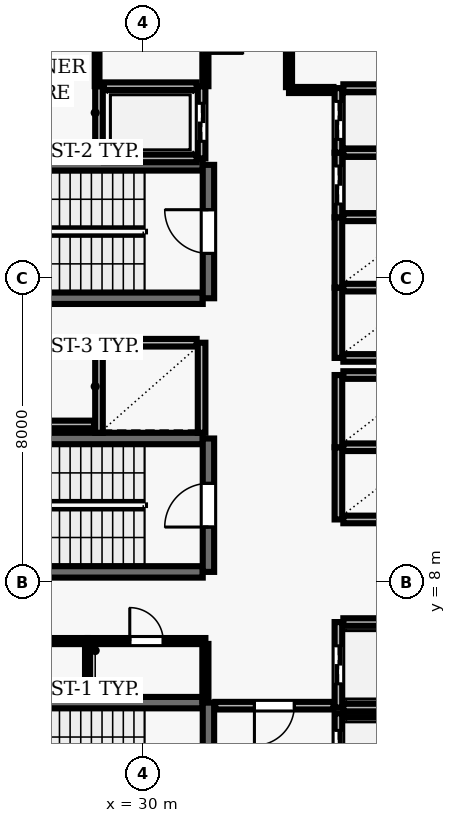
"""IFC4 building model, lengths in metres.
Left out: names, types, materials, properties, quantities, classifications, styles, units other than length and angle.
Written with IfcOpenShell. Run it as: python <this file> out.ifc"""

import sys

from ifc_helpers import new_model, si_unit, direction, frame, frame_2d, origin, place, context, subcontext, project, spatial, rectangle, extrude, element, fill, save


model = new_model("IFC4")
c1 = context("Model", 3, precision=1e-05, world=origin(), true_north=direction((0.0, 1.0)))
c2 = subcontext(c1, "Body", "Model", "MODEL_VIEW")
j1 = project(units=[si_unit("LENGTHUNIT", "METRE"), si_unit("PLANEANGLEUNIT", "RADIAN")], contexts=[c1])
p1 = place(None, origin())
s1 = spatial("IfcSite", under=j1, at=p1, CompositionType="ELEMENT")
p2 = place(p1, origin())
s2 = spatial("IfcBuilding", under=s1, at=p2, CompositionType="ELEMENT")
p3 = place(p2, frame((0.0, 0.0, 150.2)))
s3 = spatial("IfcBuildingStorey", under=s2, at=p3, CompositionType="ELEMENT", Elevation=150.2)
p4 = place(p3, frame((31.58, 4.83, 0.0), z_axis=(0.0, 0.0, 1.0), x_axis=(-1.0, 0.0, 0.0)))
e1 = element("IfcWall", 1, at=p4, inside=s3, PredefinedType="SHEAR", context=c2, shape_type="SweptSolid", body=[
    extrude(rectangle(XDim=8.36, YDim=0.3, at=frame_2d((4.18, 0.0))), origin(), (0.0, 0.0, 1.0), 3.69),
])
p5 = place(p3, frame((31.73, 0.96, 0.0), z_axis=(0.0, 0.0, 1.0), x_axis=(0.0, 1.0, 0.0)))
e2 = element("IfcWall", 2, at=p5, inside=s3, PredefinedType="SHEAR", context=c2, shape_type="SweptSolid", body=[
    extrude(rectangle(XDim=3.87, YDim=0.3, at=frame_2d((1.935, 0.0))), origin(), (0.0, 0.0, 1.0), 3.69),
])
p6 = place(p5, frame((1.54, 0.0, 0.0)))
e3 = element("IfcOpeningElement", 3, at=p6, cuts=e2, PredefinedType="OPENING", context=c2, shape_type="SweptSolid", body=[
    extrude(rectangle(XDim=1.15, YDim=2.15, at=frame_2d((0.575, 1.075))), frame((0.0, 0.16, 0.0), z_axis=(0.0, -1.0, 0.0), x_axis=(1.0, 0.0, 0.0)), (0.0, 0.0, 1.0), 0.32),
])
for number, where, z_axis, x_axis in (
    (4, (31.58, 18.98, 0.0), (0.0, 0.0, 1.0), (-1.0, 0.0, 0.0)),
    (5, (23.22, 15.47, 0.0), (0.0, 0.0, 1.0), (1.0, 0.0, 0.0)),
):
    element("IfcWall", number, at=place(p3, frame(where, z_axis=z_axis, x_axis=x_axis)), inside=s3, PredefinedType="SHEAR", context=c2, shape_type="SweptSolid", body=[
        extrude(rectangle(XDim=8.36, YDim=0.3, at=frame_2d((4.18, 0.0))), origin(), (0.0, 0.0, 1.0), 3.69),
    ])
p7 = place(p3, frame((31.73, 15.47, 0.0), z_axis=(0.0, 0.0, 1.0), x_axis=(0.0, 1.0, 0.0)))
e6 = element("IfcWall", 6, at=p7, inside=s3, PredefinedType="SHEAR", context=c2, shape_type="SweptSolid", body=[
    extrude(rectangle(XDim=3.51, YDim=0.3, at=frame_2d((1.755, 0.0))), origin(), (0.0, 0.0, 1.0), 3.69),
])
p8 = place(p7, frame((1.18, 0.0, 0.0)))
e7 = element("IfcOpeningElement", 7, at=p8, cuts=e6, PredefinedType="OPENING", context=c2, shape_type="SweptSolid", body=[
    extrude(rectangle(XDim=1.15, YDim=2.15, at=frame_2d((0.575, 1.075))), frame((0.0, 0.16, 0.0), z_axis=(0.0, -1.0, 0.0), x_axis=(1.0, 0.0, 0.0)), (0.0, 0.0, 1.0), 0.32),
])
for number, where, z_axis, x_axis in (
    (8, (31.58, 11.78, 0.0), (0.0, 0.0, 1.0), (-1.0, 0.0, 0.0)),
    (9, (23.22, 8.27, 0.0), (0.0, 0.0, 1.0), (1.0, 0.0, 0.0)),
):
    element("IfcWall", number, at=place(p3, frame(where, z_axis=z_axis, x_axis=x_axis)), inside=s3, PredefinedType="SHEAR", context=c2, shape_type="SweptSolid", body=[
        extrude(rectangle(XDim=8.36, YDim=0.3, at=frame_2d((4.18, 0.0))), origin(), (0.0, 0.0, 1.0), 3.69),
    ])
p9 = place(p3, frame((31.73, 8.27, 0.0), z_axis=(0.0, 0.0, 1.0), x_axis=(0.0, 1.0, 0.0)))
e10 = element("IfcWall", 10, at=p9, inside=s3, PredefinedType="SHEAR", context=c2, shape_type="SweptSolid", body=[
    extrude(rectangle(XDim=3.51, YDim=0.3, at=frame_2d((1.755, 0.0))), origin(), (0.0, 0.0, 1.0), 3.69),
])
p10 = place(p9, frame((1.18, 0.0, 0.0)))
e11 = element("IfcOpeningElement", 11, at=p10, cuts=e10, PredefinedType="OPENING", context=c2, shape_type="SweptSolid", body=[
    extrude(rectangle(XDim=1.15, YDim=2.15, at=frame_2d((0.575, 1.075))), frame((0.0, 0.16, 0.0), z_axis=(0.0, -1.0, 0.0), x_axis=(1.0, 0.0, 0.0)), (0.0, 0.0, 1.0), 0.32),
])
p11 = place(p3, frame((35.15, 4.55, 0.0), z_axis=(0.0, 0.0, 1.0), x_axis=(0.0, -1.0, 0.0)))
e12 = element("IfcWall", 12, at=p11, inside=s3, PredefinedType="SOLIDWALL", context=c2, shape_type="SweptSolid", body=[
    extrude(rectangle(XDim=2.1, YDim=0.2, at=frame_2d((1.05, 0.0))), origin(), (0.0, 0.0, 1.0), 3.69),
])
p12 = place(p11, frame((0.45, 0.0, 0.0)))
e13 = element("IfcOpeningElement", 13, at=p12, cuts=e12, PredefinedType="OPENING", context=c2, shape_type="SweptSolid", body=[
    extrude(rectangle(XDim=1.2, YDim=2.15, at=frame_2d((0.6, 1.075))), frame((0.0, 0.11, 0.0), z_axis=(0.0, -1.0, 0.0), x_axis=(1.0, 0.0, 0.0)), (0.0, 0.0, 1.0), 0.22),
])
p13 = place(p3, frame((37.42, 4.55, 0.0), z_axis=(0.0, 0.0, 1.0), x_axis=(-1.0, 0.0, 0.0)))
e14 = element("IfcWall", 14, at=p13, inside=s3, PredefinedType="SOLIDWALL", context=c2, shape_type="SweptSolid", body=[
    extrude(rectangle(XDim=2.14, YDim=0.2, at=frame_2d((1.07, 0.0))), origin(), (0.0, 0.0, 1.0), 3.69),
])
p14 = place(p3, frame((35.15, 6.95, 0.0), z_axis=(0.0, 0.0, 1.0), x_axis=(0.0, -1.0, 0.0)))
e15 = element("IfcWall", 15, at=p14, inside=s3, PredefinedType="SOLIDWALL", context=c2, shape_type="SweptSolid", body=[
    extrude(rectangle(XDim=2.25, YDim=0.2, at=frame_2d((1.125, 0.0))), origin(), (0.0, 0.0, 1.0), 3.69),
])
p15 = place(p14, frame((0.625, 0.0, 0.0)))
e16 = element("IfcOpeningElement", 16, at=p15, cuts=e15, PredefinedType="OPENING", context=c2, shape_type="SweptSolid", body=[
    extrude(rectangle(XDim=1.0, YDim=2.1, at=frame_2d((0.5, 1.05))), frame((0.0, 0.11, 0.0), z_axis=(0.0, -1.0, 0.0), x_axis=(1.0, 0.0, 0.0)), (0.0, 0.0, 1.0), 0.22),
])
for number, where, z_axis, x_axis in (
    (17, (35.28, 4.7, 0.0), (0.0, 0.0, 1.0), (1.0, 0.0, 0.0)),
    (18, (37.42, 6.95, 0.0), (0.0, 0.0, 1.0), (-1.0, 0.0, 0.0)),
):
    element("IfcWall", number, at=place(p3, frame(where, z_axis=z_axis, x_axis=x_axis)), inside=s3, PredefinedType="SOLIDWALL", context=c2, shape_type="SweptSolid", body=[
        extrude(rectangle(XDim=2.14, YDim=0.2, at=frame_2d((1.07, 0.0))), origin(), (0.0, 0.0, 1.0), 3.69),
    ])
p16 = place(p3, frame((35.15, 11.55, 0.0), z_axis=(0.0, 0.0, 1.0), x_axis=(0.0, -1.0, 0.0)))
e19 = element("IfcWall", 19, at=p16, inside=s3, PredefinedType="SOLIDWALL", context=c2, shape_type="SweptSolid", body=[
    extrude(rectangle(XDim=1.9, YDim=0.2, at=frame_2d((0.95, 0.0))), origin(), (0.0, 0.0, 1.0), 3.69),
])
for number, where, z_axis, x_axis in (
    (20, (35.28, 9.65, 0.0), (0.0, 0.0, 1.0), (1.0, 0.0, 0.0)),
    (21, (37.42, 11.55, 0.0), (0.0, 0.0, 1.0), (-1.0, 0.0, 0.0)),
):
    element("IfcWall", number, at=place(p3, frame(where, z_axis=z_axis, x_axis=x_axis)), inside=s3, PredefinedType="SOLIDWALL", context=c2, shape_type="SweptSolid", body=[
        extrude(rectangle(XDim=2.14, YDim=0.2, at=frame_2d((1.07, 0.0))), origin(), (0.0, 0.0, 1.0), 3.69),
    ])
p17 = place(p3, frame((35.15, 13.45, 0.0), z_axis=(0.0, 0.0, 1.0), x_axis=(0.0, -1.0, 0.0)))
e22 = element("IfcWall", 22, at=p17, inside=s3, PredefinedType="SOLIDWALL", context=c2, shape_type="SweptSolid", body=[
    extrude(rectangle(XDim=1.9, YDim=0.2, at=frame_2d((0.95, 0.0))), origin(), (0.0, 0.0, 1.0), 3.69),
])
p18 = place(p3, frame((37.42, 13.45, 0.0), z_axis=(0.0, 0.0, 1.0), x_axis=(-1.0, 0.0, 0.0)))
e23 = element("IfcWall", 23, at=p18, inside=s3, PredefinedType="SOLIDWALL", context=c2, shape_type="SweptSolid", body=[
    extrude(rectangle(XDim=2.14, YDim=0.2, at=frame_2d((1.07, 0.0))), origin(), (0.0, 0.0, 1.0), 3.69),
])
for number, where, z_axis, x_axis in (
    (24, (28.85, 14.3, 0.0), (0.0, 0.0, 1.0), (0.0, -1.0, 0.0)),
    (25, (31.55, 11.93, 0.0), (0.0, 0.0, 1.0), (0.0, 1.0, 0.0)),
):
    element("IfcWall", number, at=place(p3, frame(where, z_axis=z_axis, x_axis=x_axis)), inside=s3, PredefinedType="SOLIDWALL", context=c2, shape_type="SweptSolid", body=[
        extrude(rectangle(XDim=2.37, YDim=0.2, at=frame_2d((1.185, 0.0))), origin(), (0.0, 0.0, 1.0), 3.69),
    ])
p19 = place(p3, frame((31.42, 14.3, 0.0), z_axis=(0.0, 0.0, 1.0), x_axis=(-1.0, 0.0, 0.0)))
e26 = element("IfcWall", 26, at=p19, inside=s3, PredefinedType="SOLIDWALL", context=c2, shape_type="SweptSolid", body=[
    extrude(rectangle(XDim=2.44, YDim=0.2, at=frame_2d((1.22, 0.0))), origin(), (0.0, 0.0, 1.0), 3.69),
])
p20 = place(p3, frame((35.15, 15.75, 0.0), z_axis=(0.0, 0.0, 1.0), x_axis=(0.0, -1.0, 0.0)))
e27 = element("IfcWall", 27, at=p20, inside=s3, PredefinedType="SOLIDWALL", context=c2, shape_type="SweptSolid", body=[
    extrude(rectangle(XDim=1.85, YDim=0.2, at=frame_2d((0.925, 0.0))), origin(), (0.0, 0.0, 1.0), 3.69),
])
for number, where, z_axis, x_axis in (
    (28, (35.28, 13.9, 0.0), (0.0, 0.0, 1.0), (1.0, 0.0, 0.0)),
    (29, (37.42, 15.75, 0.0), (0.0, 0.0, 1.0), (-1.0, 0.0, 0.0)),
):
    element("IfcWall", number, at=place(p3, frame(where, z_axis=z_axis, x_axis=x_axis)), inside=s3, PredefinedType="SOLIDWALL", context=c2, shape_type="SweptSolid", body=[
        extrude(rectangle(XDim=2.14, YDim=0.2, at=frame_2d((1.07, 0.0))), origin(), (0.0, 0.0, 1.0), 3.69),
    ])
p21 = place(p3, frame((35.15, 17.6, 0.0), z_axis=(0.0, 0.0, 1.0), x_axis=(0.0, -1.0, 0.0)))
e30 = element("IfcWall", 30, at=p21, inside=s3, PredefinedType="SOLIDWALL", context=c2, shape_type="SweptSolid", body=[
    extrude(rectangle(XDim=1.85, YDim=0.2, at=frame_2d((0.925, 0.0))), origin(), (0.0, 0.0, 1.0), 3.69),
])
p22 = place(p3, frame((37.42, 17.6, 0.0), z_axis=(0.0, 0.0, 1.0), x_axis=(-1.0, 0.0, 0.0)))
e31 = element("IfcWall", 31, at=p22, inside=s3, PredefinedType="SOLIDWALL", context=c2, shape_type="SweptSolid", body=[
    extrude(rectangle(XDim=2.14, YDim=0.2, at=frame_2d((1.07, 0.0))), origin(), (0.0, 0.0, 1.0), 3.69),
])
p23 = place(p3, frame((35.15, 19.3, 0.0), z_axis=(0.0, 0.0, 1.0), x_axis=(0.0, -1.0, 0.0)))
e32 = element("IfcWall", 32, at=p23, inside=s3, PredefinedType="SOLIDWALL", context=c2, shape_type="SweptSolid", body=[
    extrude(rectangle(XDim=1.7, YDim=0.2, at=frame_2d((0.85, 0.0))), origin(), (0.0, 0.0, 1.0), 3.69),
])
p24 = place(p23, frame((0.35, 0.0, 0.0)))
e33 = element("IfcOpeningElement", 33, at=p24, cuts=e32, PredefinedType="OPENING", context=c2, shape_type="SweptSolid", body=[
    extrude(rectangle(XDim=1.0, YDim=2.1, at=frame_2d((0.5, 1.05))), frame((0.0, 0.11, 0.0), z_axis=(0.0, -1.0, 0.0), x_axis=(1.0, 0.0, 0.0)), (0.0, 0.0, 1.0), 0.22),
])
p25 = place(p3, frame((37.42, 19.3, 0.0), z_axis=(0.0, 0.0, 1.0), x_axis=(-1.0, 0.0, 0.0)))
e34 = element("IfcWall", 34, at=p25, inside=s3, PredefinedType="SOLIDWALL", context=c2, shape_type="SweptSolid", body=[
    extrude(rectangle(XDim=2.14, YDim=0.2, at=frame_2d((1.07, 0.0))), origin(), (0.0, 0.0, 1.0), 3.69),
])
p26 = place(p3, frame((35.15, 21.0, 0.0), z_axis=(0.0, 0.0, 1.0), x_axis=(0.0, -1.0, 0.0)))
e35 = element("IfcWall", 35, at=p26, inside=s3, PredefinedType="SOLIDWALL", context=c2, shape_type="SweptSolid", body=[
    extrude(rectangle(XDim=1.7, YDim=0.2, at=frame_2d((0.85, 0.0))), origin(), (0.0, 0.0, 1.0), 3.69),
])
p27 = place(p26, frame((0.35, 0.0, 0.0)))
e36 = element("IfcOpeningElement", 36, at=p27, cuts=e35, PredefinedType="OPENING", context=c2, shape_type="SweptSolid", body=[
    extrude(rectangle(XDim=1.0, YDim=2.1, at=frame_2d((0.5, 1.05))), frame((0.0, 0.11, 0.0), z_axis=(0.0, -1.0, 0.0), x_axis=(1.0, 0.0, 0.0)), (0.0, 0.0, 1.0), 0.22),
])
p28 = place(p3, frame((37.42, 21.0, 0.0), z_axis=(0.0, 0.0, 1.0), x_axis=(-1.0, 0.0, 0.0)))
e37 = element("IfcWall", 37, at=p28, inside=s3, PredefinedType="SOLIDWALL", context=c2, shape_type="SweptSolid", body=[
    extrude(rectangle(XDim=2.14, YDim=0.2, at=frame_2d((1.07, 0.0))), origin(), (0.0, 0.0, 1.0), 3.69),
])
p29 = place(p3, frame((28.85, 21.05, 0.0), z_axis=(0.0, 0.0, 1.0), x_axis=(0.0, -1.0, 0.0)))
e38 = element("IfcWall", 38, at=p29, inside=s3, PredefinedType="SOLIDWALL", context=c2, shape_type="SweptSolid", body=[
    extrude(rectangle(XDim=1.9, YDim=0.2, at=frame_2d((0.95, 0.0))), origin(), (0.0, 0.0, 1.0), 3.69),
])
p30 = place(p3, frame((31.55, 19.15, 0.0), z_axis=(0.0, 0.0, 1.0), x_axis=(0.0, 1.0, 0.0)))
e39 = element("IfcWall", 39, at=p30, inside=s3, PredefinedType="SOLIDWALL", context=c2, shape_type="SweptSolid", body=[
    extrude(rectangle(XDim=1.9, YDim=0.2, at=frame_2d((0.95, 0.0))), origin(), (0.0, 0.0, 1.0), 3.69),
])
p31 = place(p30, frame((0.45, 0.0, 0.0)))
e40 = element("IfcOpeningElement", 40, at=p31, cuts=e39, PredefinedType="OPENING", context=c2, shape_type="SweptSolid", body=[
    extrude(rectangle(XDim=1.0, YDim=2.1, at=frame_2d((0.5, 1.05))), frame((0.0, 0.11, 0.0), z_axis=(0.0, -1.0, 0.0), x_axis=(1.0, 0.0, 0.0)), (0.0, 0.0, 1.0), 0.22),
])
for number, where, z_axis, x_axis in (
    (41, (28.98, 19.15, 0.0), (0.0, 0.0, 1.0), (1.0, 0.0, 0.0)),
    (42, (31.42, 21.05, 0.0), (0.0, 0.0, 1.0), (-1.0, 0.0, 0.0)),
):
    element("IfcWall", number, at=place(p3, frame(where, z_axis=z_axis, x_axis=x_axis)), inside=s3, PredefinedType="SOLIDWALL", context=c2, shape_type="SweptSolid", body=[
        extrude(rectangle(XDim=2.44, YDim=0.2, at=frame_2d((1.22, 0.0))), origin(), (0.0, 0.0, 1.0), 3.69),
    ])
p32 = place(p3, frame((24.35, 12.15, 0.0), z_axis=(0.0, 0.0, 1.0), x_axis=(1.0, 0.0, 0.0)))
e43 = element("IfcWall", 43, at=p32, inside=s3, PredefinedType="SOLIDWALL", context=c2, shape_type="SweptSolid", body=[
    extrude(rectangle(XDim=4.37, YDim=0.2, at=frame_2d((2.185, 0.0))), origin(), (0.0, 0.0, 1.0), 3.69),
])
p33 = place(p3, frame((24.35, 14.3, 0.0), z_axis=(0.0, 0.0, 1.0), x_axis=(1.0, 0.0, 0.0)))
e44 = element("IfcWall", 44, at=p33, inside=s3, PredefinedType="SOLIDWALL", context=c2, shape_type="SweptSolid", body=[
    extrude(rectangle(XDim=4.37, YDim=0.2, at=frame_2d((2.185, 0.0))), origin(), (0.0, 0.0, 1.0), 3.69),
])
p34 = place(p33, frame((1.76, 0.0, 0.0)))
e45 = element("IfcOpeningElement", 45, at=p34, cuts=e44, PredefinedType="OPENING", context=c2, shape_type="SweptSolid", body=[
    extrude(rectangle(XDim=0.85, YDim=2.1, at=frame_2d((0.425, 1.05))), frame((0.0, 0.11, 0.0), z_axis=(0.0, -1.0, 0.0), x_axis=(1.0, 0.0, 0.0)), (0.0, 0.0, 1.0), 0.22),
])
p35 = place(p3, frame((25.4, 6.45, 0.0), z_axis=(0.0, 0.0, 1.0), x_axis=(1.0, 0.0, 0.0)))
e46 = element("IfcWall", 46, at=p35, inside=s3, PredefinedType="PARTITIONING", context=c2, shape_type="SweptSolid", body=[
    extrude(rectangle(XDim=3.15, YDim=0.16, at=frame_2d((1.575, 0.0))), origin(), (0.0, 0.0, 1.0), 3.69),
])
p36 = place(p35, frame((1.135, 0.0, 0.0)))
e47 = element("IfcOpeningElement", 47, at=p36, cuts=e46, PredefinedType="OPENING", context=c2, shape_type="SweptSolid", body=[
    extrude(rectangle(XDim=0.88, YDim=2.1, at=frame_2d((0.44, 1.05))), frame((0.0, 0.09, 0.0), z_axis=(0.0, -1.0, 0.0), x_axis=(1.0, 0.0, 0.0)), (0.0, 0.0, 1.0), 0.18),
])
p37 = place(p3, frame((28.55, 6.45, 0.0), z_axis=(0.0, 0.0, 1.0), x_axis=(1.0, 0.0, 0.0)))
e48 = element("IfcWall", 48, at=p37, inside=s3, PredefinedType="PARTITIONING", context=c2, shape_type="SweptSolid", body=[
    extrude(rectangle(XDim=3.1, YDim=0.16, at=frame_2d((1.55, 0.0))), origin(), (0.0, 0.0, 1.0), 3.69),
])
p38 = place(p37, frame((1.11, 0.0, 0.0)))
e49 = element("IfcOpeningElement", 49, at=p38, cuts=e48, PredefinedType="OPENING", context=c2, shape_type="SweptSolid", body=[
    extrude(rectangle(XDim=0.88, YDim=2.1, at=frame_2d((0.44, 1.05))), frame((0.0, 0.09, 0.0), z_axis=(0.0, -1.0, 0.0), x_axis=(1.0, 0.0, 0.0)), (0.0, 0.0, 1.0), 0.18),
])
p39 = place(p3, frame((35.02, 4.75, 0.0), z_axis=(0.0, 0.0, 1.0), x_axis=(-1.0, 0.0, 0.0)))
e50 = element("IfcWall", 50, at=p39, inside=s3, PredefinedType="SOLIDWALL", context=c2, shape_type="SweptSolid", body=[
    extrude(rectangle(XDim=3.11, YDim=0.2, at=frame_2d((1.555, 0.0))), origin(), (0.0, 0.0, 1.0), 3.69),
])
p40 = place(p39, frame((1.03, 0.0, 0.0)))
e51 = element("IfcOpeningElement", 51, at=p40, cuts=e50, PredefinedType="OPENING", context=c2, shape_type="SweptSolid", body=[
    extrude(rectangle(XDim=1.05, YDim=2.15, at=frame_2d((0.525, 1.075))), frame((0.0, 0.11, 0.0), z_axis=(0.0, -1.0, 0.0), x_axis=(1.0, 0.0, 0.0)), (0.0, 0.0, 1.0), 0.22),
])
p41 = place(p3, frame((35.02, 20.95, 0.0), z_axis=(0.0, 0.0, 1.0), x_axis=(-1.0, 0.0, 0.0)))
e52 = element("IfcWall", 52, at=p41, inside=s3, PredefinedType="PARTITIONING", context=c2, shape_type="SweptSolid", body=[
    extrude(rectangle(XDim=1.17, YDim=0.16, at=frame_2d((0.585, 0.0))), origin(), (0.0, 0.0, 1.0), 3.69),
])
p42 = place(p3, frame((28.55, 5.01, 0.0), z_axis=(0.0, 0.0, 1.0), x_axis=(0.0, 1.0, 0.0)))
e53 = element("IfcWall", 53, at=p42, inside=s3, PredefinedType="PARTITIONING", context=c2, shape_type="SweptSolid", body=[
    extrude(rectangle(XDim=1.365, YDim=0.135, at=frame_2d((0.683, 0.0))), origin(), (0.0, 0.0, 1.0), 3.69),
])
p43 = place(p3, frame((28.8, 23.775, 0.0), z_axis=(0.0, 0.0, 1.0), x_axis=(0.0, -1.0, 0.0)))
e54 = element("IfcWall", 54, at=p43, inside=s3, PredefinedType="PARTITIONING", context=c2, shape_type="SweptSolid", body=[
    extrude(rectangle(XDim=2.725, YDim=0.125, at=frame_2d((1.362, 0.0))), origin(), (0.0, 0.0, 1.0), 3.69),
])
p44 = place(p3, frame((31.65, 4.86, 0.0), z_axis=(0.0, 0.0, 1.0), x_axis=(0.0, 1.0, 0.0)))
e55 = element("IfcWall", 55, at=p44, inside=s3, PredefinedType="PARTITIONING", context=c2, shape_type="SweptSolid", body=[
    extrude(rectangle(XDim=1.515, YDim=0.16, at=frame_2d((0.757, 0.0))), origin(), (0.0, 0.0, 1.0), 3.69),
])
p45 = place(p3, frame((31.65, 23.775, 0.0), z_axis=(0.0, 0.0, 1.0), x_axis=(0.0, -1.0, 0.0)))
e56 = element("IfcWall", 56, at=p45, inside=s3, PredefinedType="PARTITIONING", context=c2, shape_type="SweptSolid", body=[
    extrude(rectangle(XDim=2.725, YDim=0.16, at=frame_2d((1.362, 0.0))), origin(), (0.0, 0.0, 1.0), 3.69),
])
p46 = place(p45, frame((0.862, 0.0, 0.0)))
e57 = element("IfcOpeningElement", 57, at=p46, cuts=e56, PredefinedType="OPENING", context=c2, shape_type="SweptSolid", body=[
    extrude(rectangle(XDim=1.0, YDim=2.1, at=frame_2d((0.5, 1.05))), frame((0.0, 0.09, 0.0), z_axis=(0.0, -1.0, 0.0), x_axis=(1.0, 0.0, 0.0)), (0.0, 0.0, 1.0), 0.18),
])
p47 = place(p3, frame((33.85, 21.025, 0.0), z_axis=(0.0, 0.0, 1.0), x_axis=(0.0, 1.0, 0.0)))
e58 = element("IfcWall", 58, at=p47, inside=s3, PredefinedType="PARTITIONING", context=c2, shape_type="SweptSolid", body=[
    extrude(rectangle(XDim=2.75, YDim=0.16, at=frame_2d((1.375, 0.0))), origin(), (0.0, 0.0, 1.0), 3.69),
])
p48 = place(p8, origin())
e59 = element("IfcDoor", 59, at=p48, inside=s3, OperationType="SINGLE_SWING_RIGHT", PredefinedType="DOOR", context=c2, shape_type="SweptSolid", body=[
    extrude(rectangle(XDim=1.15, YDim=2.15, at=frame_2d((0.575, 1.075))), frame((0.0, 0.025, 0.0), z_axis=(0.0, -1.0, 0.0), x_axis=(1.0, 0.0, 0.0)), (0.0, 0.0, 1.0), 0.05),
])
fill(e7, e59)
p49 = place(p10, origin())
e60 = element("IfcDoor", 60, at=p49, inside=s3, OperationType="SINGLE_SWING_LEFT", PredefinedType="DOOR", context=c2, shape_type="SweptSolid", body=[
    extrude(rectangle(XDim=1.15, YDim=2.15, at=frame_2d((0.575, 1.075))), frame((0.0, 0.025, 0.0), z_axis=(0.0, -1.0, 0.0), x_axis=(1.0, 0.0, 0.0)), (0.0, 0.0, 1.0), 0.05),
])
fill(e11, e60)
p50 = place(p12, origin())
e61 = element("IfcDoor", 61, at=p50, inside=s3, OperationType="DOUBLE_DOOR_SLIDING", PredefinedType="DOOR", context=c2, shape_type="SweptSolid", body=[
    extrude(rectangle(XDim=1.2, YDim=2.15, at=frame_2d((0.6, 1.075))), frame((0.0, 0.025, 0.0), z_axis=(0.0, -1.0, 0.0), x_axis=(1.0, 0.0, 0.0)), (0.0, 0.0, 1.0), 0.05),
])
fill(e13, e61)
p51 = place(p15, origin())
e62 = element("IfcDoor", 62, at=p51, inside=s3, OperationType="DOUBLE_DOOR_SLIDING", PredefinedType="DOOR", context=c2, shape_type="SweptSolid", body=[
    extrude(rectangle(XDim=1.0, YDim=2.1, at=frame_2d((0.5, 1.05))), frame((0.0, 0.025, 0.0), z_axis=(0.0, -1.0, 0.0), x_axis=(1.0, 0.0, 0.0)), (0.0, 0.0, 1.0), 0.05),
])
fill(e16, e62)
p52 = place(p24, origin())
e63 = element("IfcDoor", 63, at=p52, inside=s3, OperationType="DOUBLE_DOOR_SLIDING", PredefinedType="DOOR", context=c2, shape_type="SweptSolid", body=[
    extrude(rectangle(XDim=1.0, YDim=2.1, at=frame_2d((0.5, 1.05))), frame((0.0, 0.025, 0.0), z_axis=(0.0, -1.0, 0.0), x_axis=(1.0, 0.0, 0.0)), (0.0, 0.0, 1.0), 0.05),
])
fill(e33, e63)
p53 = place(p27, origin())
e64 = element("IfcDoor", 64, at=p53, inside=s3, OperationType="DOUBLE_DOOR_SLIDING", PredefinedType="DOOR", context=c2, shape_type="SweptSolid", body=[
    extrude(rectangle(XDim=1.0, YDim=2.1, at=frame_2d((0.5, 1.05))), frame((0.0, 0.025, 0.0), z_axis=(0.0, -1.0, 0.0), x_axis=(1.0, 0.0, 0.0)), (0.0, 0.0, 1.0), 0.05),
])
fill(e36, e64)
p54 = place(p31, origin())
e65 = element("IfcDoor", 65, at=p54, inside=s3, OperationType="DOUBLE_DOOR_SLIDING", PredefinedType="DOOR", context=c2, shape_type="SweptSolid", body=[
    extrude(rectangle(XDim=1.0, YDim=2.1, at=frame_2d((0.5, 1.05))), frame((0.0, 0.025, 0.0), z_axis=(0.0, -1.0, 0.0), x_axis=(1.0, 0.0, 0.0)), (0.0, 0.0, 1.0), 0.05),
])
fill(e40, e65)
p55 = place(p40, origin())
e66 = element("IfcDoor", 66, at=p55, inside=s3, OperationType="SINGLE_SWING_RIGHT", PredefinedType="DOOR", context=c2, shape_type="SweptSolid", body=[
    extrude(rectangle(XDim=1.05, YDim=2.15, at=frame_2d((0.525, 1.075))), frame((0.0, 0.025, 0.0), z_axis=(0.0, -1.0, 0.0), x_axis=(1.0, 0.0, 0.0)), (0.0, 0.0, 1.0), 0.05),
])
fill(e51, e66)
p56 = place(p46, origin())
e67 = element("IfcDoor", 67, at=p56, inside=s3, OperationType="SINGLE_SWING_RIGHT", PredefinedType="DOOR", context=c2, shape_type="SweptSolid", body=[
    extrude(rectangle(XDim=1.0, YDim=2.1, at=frame_2d((0.5, 1.05))), frame((0.0, 0.025, 0.0), z_axis=(0.0, -1.0, 0.0), x_axis=(1.0, 0.0, 0.0)), (0.0, 0.0, 1.0), 0.05),
])
fill(e57, e67)
p57 = place(p38, origin())
e68 = element("IfcDoor", 68, at=p57, inside=s3, OperationType="SINGLE_SWING_LEFT", PredefinedType="DOOR", context=c2, shape_type="SweptSolid", body=[
    extrude(rectangle(XDim=0.88, YDim=2.1, at=frame_2d((0.44, 1.05))), frame((0.0, 0.025, 0.0), z_axis=(0.0, -1.0, 0.0), x_axis=(1.0, 0.0, 0.0)), (0.0, 0.0, 1.0), 0.05),
])
fill(e49, e68)
save(model, sys.argv[1])
